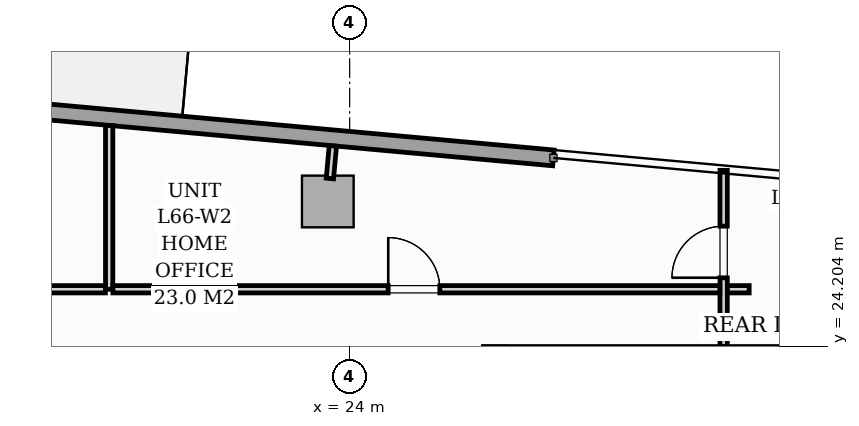
"""IFC4 building model, lengths in metres.
Left out: names, types, materials, properties, quantities, classifications, styles, units other than length and angle.
Written with IfcOpenShell. Run it as: python <this file> out.ifc"""

import sys

from ifc_helpers import new_model, si_unit, direction, frame, frame_2d, origin, origin_2d, place, context, subcontext, project, spatial, rectangle, i_section, extrude, source, transform, mapped, element, fill, save


model = new_model("IFC4")
c1 = context("Model", 3, precision=1e-05, world=origin(), true_north=direction((0.0, 1.0)))
c2 = subcontext(c1, "Body", "Model", "MODEL_VIEW")
j1 = project(units=[si_unit("LENGTHUNIT", "METRE"), si_unit("PLANEANGLEUNIT", "RADIAN")], contexts=[c1])
p1 = place(None, origin())
s1 = spatial("IfcSite", under=j1, at=p1, CompositionType="ELEMENT")
p2 = place(p1, origin())
s2 = spatial("IfcBuilding", under=s1, at=p2, CompositionType="ELEMENT")
p3 = place(p2, frame((0.0, 0.0, 229.8)))
s3 = spatial("IfcBuildingStorey", under=s2, at=p3, CompositionType="ELEMENT", Elevation=229.8)
m1 = source(origin(), c2, "Body", "SweptSolid", [
    extrude(i_section(OverallWidth=0.409, OverallDepth=0.425, WebThickness=0.033, FlangeThickness=0.052, FilletRadius=0.018, at=origin_2d()), origin(), (0.0, 0.0, 1.0), 3.296),
])
p4 = place(p3, frame((26.4, 24.0, 0.002), z_axis=(0.0, 0.0, 1.0), x_axis=(1.0, 0.0, 0.0)))
e1 = element("IfcColumn", 1, at=p4, inside=s3, PredefinedType="PILASTER", context=c2, shape_type="MappedRepresentation", body=[
    mapped(m1, transform((0.0, 0.0, 0.0), scale=1.0)),
])
m2 = source(origin(), c2, "Body", "SweptSolid", [
    extrude(rectangle(XDim=0.85, YDim=0.85, at=origin_2d()), origin(), (0.0, 0.0, 1.0), 3.296),
])
p5 = place(p3, frame((23.64, 26.585, 0.002), z_axis=(0.0, 0.0, 1.0), x_axis=(0.995884398616, -0.090632580198, 0.0)))
e2 = element("IfcColumn", 2, at=p5, inside=s3, PredefinedType="COLUMN", context=c2, shape_type="MappedRepresentation", body=[
    mapped(m2, transform((0.0, 0.0, 0.0), scale=1.0)),
])
p6 = place(p3, frame((12.781, 28.628, 0.0), z_axis=(0.0, 0.0, 1.0), x_axis=(0.995884584572, -0.090630536861, 0.0)))
e3 = element("IfcWall", 3, at=p6, inside=s3, PredefinedType="STANDARD", context=c2, shape_type="SweptSolid", body=[
    extrude(rectangle(XDim=14.63, YDim=0.26, at=frame_2d((7.315, 0.0))), origin(), (0.0, 0.0, 1.0), 3.04),
])
p7 = place(p6, frame((4.485, 0.0, 0.0)))
e4 = element("IfcOpeningElement", 4, at=p7, cuts=e3, PredefinedType="OPENING", context=c2, shape_type="SweptSolid", body=[
    extrude(rectangle(XDim=1.8, YDim=2.06, at=frame_2d((0.9, 1.03))), frame((0.0, 0.14, 0.0), z_axis=(0.0, -1.0, 0.0), x_axis=(1.0, 0.0, 0.0)), (0.0, 0.0, 1.0), 0.28),
])
p8 = place(p6, frame((2.05, 0.0, 0.65)))
e5 = element("IfcOpeningElement", 5, at=p8, cuts=e3, PredefinedType="OPENING", context=c2, shape_type="SweptSolid", body=[
    extrude(rectangle(XDim=1.6, YDim=1.5, at=frame_2d((0.8, 0.75))), frame((0.0, 0.14, 0.0), z_axis=(0.0, -1.0, 0.0), x_axis=(1.0, 0.0, 0.0)), (0.0, 0.0, 1.0), 0.28),
])
p9 = place(p3, frame((30.15, 24.202, 0.0), z_axis=(0.0, 0.0, 1.0), x_axis=(0.0, 1.0, 0.0)))
e6 = element("IfcWall", 6, at=p9, inside=s3, PredefinedType="PARTITIONING", context=c2, shape_type="SweptSolid", body=[
    extrude(rectangle(XDim=2.896, YDim=0.12, at=frame_2d((1.448, 0.0))), origin(), (0.0, 0.0, 1.0), 3.04),
])
p10 = place(p9, frame((1.128, 0.0, 0.0)))
e7 = element("IfcOpeningElement", 7, at=p10, cuts=e6, PredefinedType="OPENING", context=c2, shape_type="SweptSolid", body=[
    extrude(rectangle(XDim=0.85, YDim=2.05, at=frame_2d((0.425, 1.025))), frame((0.0, 0.07, 0.0), z_axis=(0.0, -1.0, 0.0), x_axis=(1.0, 0.0, 0.0)), (0.0, 0.0, 1.0), 0.14),
])
p11 = place(p3, frame((20.045, 25.142, 0.0), z_axis=(0.0, 0.0, 1.0), x_axis=(0.0, 1.0, 0.0)))
e8 = element("IfcWall", 8, at=p11, inside=s3, PredefinedType="PARTITIONING", context=c2, shape_type="SweptSolid", body=[
    extrude(rectangle(XDim=2.692, YDim=0.12, at=frame_2d((1.346, 0.0))), origin(), (0.0, 0.0, 1.0), 3.04),
])
p12 = place(p3, frame((10.034, 25.142, 0.0), z_axis=(0.0, 0.0, 1.0), x_axis=(1.0, 0.0, 0.0)))
e9 = element("IfcWall", 9, at=p12, inside=s3, PredefinedType="PARTITIONING", context=c2, shape_type="SweptSolid", body=[
    extrude(rectangle(XDim=9.949, YDim=0.12, at=frame_2d((4.975, 0.0))), origin(), (0.0, 0.0, 1.0), 3.04),
])
p13 = place(p12, frame((4.813, 0.0, 0.0)))
e10 = element("IfcOpeningElement", 10, at=p13, cuts=e9, PredefinedType="OPENING", context=c2, shape_type="SweptSolid", body=[
    extrude(rectangle(XDim=0.85, YDim=2.05, at=frame_2d((0.425, 1.025))), frame((0.0, 0.07, 0.0), z_axis=(0.0, -1.0, 0.0), x_axis=(1.0, 0.0, 0.0)), (0.0, 0.0, 1.0), 0.14),
])
p14 = place(p3, frame((20.107, 25.142, 0.0), z_axis=(0.0, 0.0, 1.0), x_axis=(1.0, 0.0, 0.0)))
e11 = element("IfcWall", 11, at=p14, inside=s3, PredefinedType="PARTITIONING", context=c2, shape_type="SweptSolid", body=[
    extrude(rectangle(XDim=9.981, YDim=0.12, at=frame_2d((4.99, 0.0))), origin(), (0.0, 0.0, 1.0), 3.04),
])
p15 = place(p14, frame((4.526, 0.0, 0.0)))
e12 = element("IfcOpeningElement", 12, at=p15, cuts=e11, PredefinedType="OPENING", context=c2, shape_type="SweptSolid", body=[
    extrude(rectangle(XDim=0.85, YDim=2.05, at=frame_2d((0.425, 1.025))), frame((0.0, 0.07, 0.0), z_axis=(0.0, -1.0, 0.0), x_axis=(1.0, 0.0, 0.0)), (0.0, 0.0, 1.0), 0.14),
])
p16 = place(p3, frame((30.212, 25.142, 0.0), z_axis=(0.0, 0.0, 1.0), x_axis=(1.0, 0.0, 0.0)))
e13 = element("IfcWall", 13, at=p16, inside=s3, PredefinedType="PARTITIONING", context=c2, shape_type="SweptSolid", body=[
    extrude(rectangle(XDim=0.358, YDim=0.12, at=frame_2d((0.179, 0.0))), origin(), (0.0, 0.0, 1.0), 3.04),
])
p17 = place(p3, frame((23.675, 26.964, 0.0), z_axis=(0.0, 0.0, 1.0), x_axis=(0.090740281653, 0.995874591144, 0.0)))
e14 = element("IfcWall", 14, at=p17, inside=s3, PredefinedType="PARTITIONING", context=c2, shape_type="SweptSolid", body=[
    extrude(rectangle(XDim=0.538, YDim=0.12, at=frame_2d((0.269, 0.0))), origin(), (0.0, 0.0, 1.0), 3.04),
])
m3 = source(origin(), c2, "Body", "SweptSolid", [
    extrude(rectangle(XDim=0.85, YDim=2.05, at=frame_2d((0.425, 1.025))), frame((0.0, 0.025, 0.0), z_axis=(0.0, -1.0, 0.0), x_axis=(1.0, 0.0, 0.0)), (0.0, 0.0, 1.0), 0.05),
])
p18 = place(p10, origin())
e15 = element("IfcDoor", 15, at=p18, inside=s3, OperationType="SINGLE_SWING_LEFT", PredefinedType="DOOR", context=c2, shape_type="MappedRepresentation", body=[
    mapped(m3, transform((0.0, 0.0, 0.0), scale=1.0)),
])
fill(e7, e15)
p19 = place(p15, origin())
e16 = element("IfcDoor", 16, at=p19, inside=s3, OperationType="SINGLE_SWING_LEFT", PredefinedType="DOOR", context=c2, shape_type="MappedRepresentation", body=[
    mapped(m3, transform((0.0, 0.0, 0.0), scale=1.0)),
])
fill(e12, e16)
save(model, sys.argv[1])
